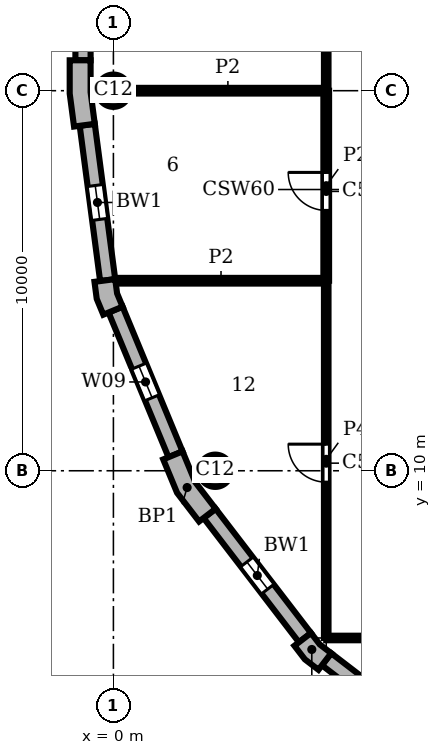
"""IFC4 building model, lengths in metres.
Left out: names, types, materials, properties, quantities, classifications, styles, units other than length and angle.
Written with IfcOpenShell. Run it as: python <this file> out.ifc"""

import sys

from ifc_helpers import new_model, si_unit, direction, frame, frame_2d, origin, origin_2d, place, context, subcontext, project, spatial, polyline, rectangle, circle, outline, extrude, element, fill, save


model = new_model("IFC4")
c1 = context("Model", 3, precision=1e-05, world=origin(), true_north=direction((0.0, 1.0)))
c2 = subcontext(c1, "Body", "Model", "MODEL_VIEW")
j1 = project(units=[si_unit("LENGTHUNIT", "METRE"), si_unit("PLANEANGLEUNIT", "RADIAN")], contexts=[c1])
p1 = place(None, origin())
s1 = spatial("IfcSite", under=j1, at=p1, CompositionType="ELEMENT")
p2 = place(p1, origin())
s2 = spatial("IfcBuilding", under=s1, at=p2, CompositionType="ELEMENT")
p3 = place(p2, frame((0.0, 0.0, 290.4)))
s3 = spatial("IfcBuildingStorey", under=s2, at=p3, CompositionType="ELEMENT", Elevation=290.4)
for number, where, z_axis, x_axis in (
    (1, (0.0, 20.0, 0.0), (0.0, 0.0, 1.0), (1.0, 0.0, 0.0)),
    (2, (2.679, 10.0, 0.0), (0.0, 0.0, 1.0), (1.0, 0.0, 0.0)),
):
    element("IfcColumn", number, at=place(p3, frame(where, z_axis=z_axis, x_axis=x_axis)), inside=s3, PredefinedType="COLUMN", context=c2, shape_type="SweptSolid", body=[
        extrude(circle(Radius=0.425, at=origin_2d()), origin(), (0.0, 0.0, 1.0), 3.9),
    ])
p4 = place(p3, origin())
e3 = element("IfcWall", 3, at=p4, inside=s3, PredefinedType="SOLIDWALL", context=c2, shape_type="SweptSolid", body=[
    extrude(outline(polyline([(-1.0, 20.8), (-1.15, 20.8), (-1.15, 19.925), (-1.036, 19.057), (-0.887, 19.076), (-0.49, 19.128), (-0.6, 19.961), (-0.6, 20.8), (-1.0, 20.8)])), origin(), (0.0, 0.0, 1.0), 3.9),
])
e4 = element("IfcWall", 4, at=p4, inside=s3, PredefinedType="SOLIDWALL", context=c2, shape_type="SweptSolid", body=[
    extrude(outline(polyline([(-0.349, 14.99), (-0.498, 14.971), (-0.439, 14.523), (-0.266, 14.106), (-0.128, 14.164), (0.242, 14.317), (0.097, 14.667), (0.047, 15.043), (-0.349, 14.99)])), origin(), (0.0, 0.0, 1.0), 3.9),
])
e5 = element("IfcWall", 5, at=p4, inside=s3, PredefinedType="SOLIDWALL", context=c2, shape_type="SweptSolid", body=[
    extrude(outline(polyline([(1.449, 10.356), (1.311, 10.299), (1.675, 9.42), (2.254, 8.665), (2.373, 8.757), (2.69, 9.0), (2.155, 9.698), (1.819, 10.51), (1.449, 10.356)])), origin(), (0.0, 0.0, 1.0), 3.9),
])
e6 = element("IfcWall", 6, at=p4, inside=s3, PredefinedType="SOLIDWALL", context=c2, shape_type="SweptSolid", body=[
    extrude(outline(polyline([(4.882, 5.487), (4.763, 5.396), (5.038, 5.038), (5.396, 4.763), (5.487, 4.882), (5.731, 5.199), (5.43, 5.43), (5.199, 5.731), (4.882, 5.487)])), origin(), (0.0, 0.0, 1.0), 3.9),
])
p5 = place(p3, frame((-0.8, 39.2, 0.0), z_axis=(0.0, 0.0, 1.0), x_axis=(0.0, -1.0, 0.0)))
e7 = element("IfcWall", 7, at=p5, inside=s3, PredefinedType="SOLIDWALL", context=c2, shape_type="SweptSolid", body=[
    extrude(rectangle(XDim=18.4, YDim=0.4, at=frame_2d((9.2, 0.0))), origin(), (0.0, 0.0, 1.0), 3.9),
])
p6 = place(p5, frame((3.75, 0.0, 0.9)))
e8 = element("IfcOpeningElement", 8, at=p6, cuts=e7, PredefinedType="OPENING", context=c2, shape_type="SweptSolid", body=[
    extrude(rectangle(XDim=0.9, YDim=2.35, at=frame_2d((0.45, 1.175))), frame((0.0, 0.21, 0.0), z_axis=(0.0, -1.0, 0.0), x_axis=(1.0, 0.0, 0.0)), (0.0, 0.0, 1.0), 0.42),
])
p7 = place(p5, frame((13.75, 0.0, 0.9)))
e9 = element("IfcOpeningElement", 9, at=p7, cuts=e7, PredefinedType="OPENING", context=c2, shape_type="SweptSolid", body=[
    extrude(rectangle(XDim=0.9, YDim=2.35, at=frame_2d((0.45, 1.175))), frame((0.0, 0.21, 0.0), z_axis=(0.0, -1.0, 0.0), x_axis=(1.0, 0.0, 0.0)), (0.0, 0.0, 1.0), 0.42),
])
p8 = place(p3, frame((-0.689, 19.102, 0.0), z_axis=(0.0, 0.0, 1.0), x_axis=(0.130514280502, -0.991446429508, 0.0)))
e10 = element("IfcWall", 10, at=p8, inside=s3, PredefinedType="SOLIDWALL", context=c2, shape_type="SweptSolid", body=[
    extrude(rectangle(XDim=4.121, YDim=0.4, at=frame_2d((2.061, 0.0))), origin(), (0.0, 0.0, 1.0), 3.9),
])
p9 = place(p8, frame((1.611, 0.0, 0.9)))
e11 = element("IfcOpeningElement", 11, at=p9, cuts=e10, PredefinedType="OPENING", context=c2, shape_type="SweptSolid", body=[
    extrude(rectangle(XDim=0.9, YDim=2.35, at=frame_2d((0.45, 1.175))), frame((0.0, 0.21, 0.0), z_axis=(0.0, -1.0, 0.0), x_axis=(1.0, 0.0, 0.0)), (0.0, 0.0, 1.0), 0.42),
])
p10 = place(p3, frame((0.057, 14.24, 0.0), z_axis=(0.0, 0.0, 1.0), x_axis=(0.382721546029, -0.923863744394, 0.0)))
e12 = element("IfcWall", 12, at=p10, inside=s3, PredefinedType="SOLIDWALL", context=c2, shape_type="SweptSolid", body=[
    extrude(rectangle(XDim=4.121, YDim=0.4, at=frame_2d((2.061, 0.0))), origin(), (0.0, 0.0, 1.0), 3.9),
])
p11 = place(p10, frame((1.611, 0.0, 0.9)))
e13 = element("IfcOpeningElement", 13, at=p11, cuts=e12, PredefinedType="OPENING", context=c2, shape_type="SweptSolid", body=[
    extrude(rectangle(XDim=0.9, YDim=2.35, at=frame_2d((0.45, 1.175))), frame((0.0, 0.21, 0.0), z_axis=(0.0, -1.0, 0.0), x_axis=(1.0, 0.0, 0.0)), (0.0, 0.0, 1.0), 0.42),
])
p12 = place(p3, frame((2.532, 8.878, 0.0), z_axis=(0.0, 0.0, 1.0), x_axis=(0.608759824817, -0.793354571229, 0.0)))
e14 = element("IfcWall", 14, at=p12, inside=s3, PredefinedType="SOLIDWALL", context=c2, shape_type="SweptSolid", body=[
    extrude(rectangle(XDim=4.121, YDim=0.4, at=frame_2d((2.061, 0.0))), origin(), (0.0, 0.0, 1.0), 3.9),
])
p13 = place(p12, frame((1.611, 0.0, 0.9)))
e15 = element("IfcOpeningElement", 15, at=p13, cuts=e14, PredefinedType="OPENING", context=c2, shape_type="SweptSolid", body=[
    extrude(rectangle(XDim=0.9, YDim=2.35, at=frame_2d((0.45, 1.175))), frame((0.0, 0.21, 0.0), z_axis=(0.0, -1.0, 0.0), x_axis=(1.0, 0.0, 0.0)), (0.0, 0.0, 1.0), 0.42),
])
p14 = place(p3, frame((5.609, 5.041, 0.0), z_axis=(0.0, 0.0, 1.0), x_axis=(0.793354571229, -0.608759824817, 0.0)))
e16 = element("IfcWall", 16, at=p14, inside=s3, PredefinedType="SOLIDWALL", context=c2, shape_type="SweptSolid", body=[
    extrude(rectangle(XDim=4.121, YDim=0.4, at=frame_2d((2.061, 0.0))), origin(), (0.0, 0.0, 1.0), 3.9),
])
p15 = place(p14, frame((1.611, 0.0, 0.9)))
e17 = element("IfcOpeningElement", 17, at=p15, cuts=e16, PredefinedType="OPENING", context=c2, shape_type="SweptSolid", body=[
    extrude(rectangle(XDim=0.9, YDim=2.35, at=frame_2d((0.45, 1.175))), frame((0.0, 0.21, 0.0), z_axis=(0.0, -1.0, 0.0), x_axis=(1.0, 0.0, 0.0)), (0.0, 0.0, 1.0), 0.42),
])
p16 = place(p3, frame((5.6, 15.0, 0.0), z_axis=(0.0, 0.0, 1.0), x_axis=(0.0, 1.0, 0.0)))
e18 = element("IfcWall", 18, at=p16, inside=s3, PredefinedType="PARTITIONING", context=c2, shape_type="SweptSolid", body=[
    extrude(rectangle(XDim=5.0, YDim=0.15, at=frame_2d((2.5, 0.0))), origin(), (0.0, 0.0, 1.0), 3.58),
])
p17 = place(p16, frame((1.85, 0.0, 0.0)))
e19 = element("IfcOpeningElement", 19, at=p17, cuts=e18, PredefinedType="OPENING", context=c2, shape_type="SweptSolid", body=[
    extrude(rectangle(XDim=1.0, YDim=2.1, at=frame_2d((0.5, 1.05))), frame((0.0, 0.085, 0.0), z_axis=(0.0, -1.0, 0.0), x_axis=(1.0, 0.0, 0.0)), (0.0, 0.0, 1.0), 0.17),
])
p18 = place(p3, frame((0.063, 15.0, 0.0), z_axis=(0.0, 0.0, 1.0), x_axis=(1.0, 0.0, 0.0)))
e20 = element("IfcWall", 20, at=p18, inside=s3, PredefinedType="PARTITIONING", context=c2, shape_type="SweptSolid", body=[
    extrude(rectangle(XDim=5.537, YDim=0.15, at=frame_2d((2.769, 0.0))), origin(), (0.0, 0.0, 1.0), 3.58),
])
p19 = place(p3, frame((0.425, 20.0, 0.0), z_axis=(0.0, 0.0, 1.0), x_axis=(1.0, 0.0, 0.0)))
e21 = element("IfcWall", 21, at=p19, inside=s3, PredefinedType="PARTITIONING", context=c2, shape_type="SweptSolid", body=[
    extrude(rectangle(XDim=5.175, YDim=0.15, at=frame_2d((2.587, 0.0))), origin(), (0.0, 0.0, 1.0), 3.58),
])
p20 = place(p3, frame((5.6, 5.6, 0.0), z_axis=(0.0, 0.0, 1.0), x_axis=(0.0, 1.0, 0.0)))
e22 = element("IfcWall", 22, at=p20, inside=s3, PredefinedType="PARTITIONING", context=c2, shape_type="SweptSolid", body=[
    extrude(rectangle(XDim=9.4, YDim=0.12, at=frame_2d((4.7, 0.0))), origin(), (0.0, 0.0, 1.0), 3.58),
])
p21 = place(p20, frame((4.1, 0.0, 0.0)))
e23 = element("IfcOpeningElement", 23, at=p21, cuts=e22, PredefinedType="OPENING", context=c2, shape_type="SweptSolid", body=[
    extrude(rectangle(XDim=1.0, YDim=2.1, at=frame_2d((0.5, 1.05))), frame((0.0, 0.07, 0.0), z_axis=(0.0, -1.0, 0.0), x_axis=(1.0, 0.0, 0.0)), (0.0, 0.0, 1.0), 0.14),
])
p22 = place(p3, frame((5.6, 20.0, 0.0), z_axis=(0.0, 0.0, 1.0), x_axis=(0.0, 1.0, 0.0)))
e24 = element("IfcWall", 24, at=p22, inside=s3, PredefinedType="PARTITIONING", context=c2, shape_type="SweptSolid", body=[
    extrude(rectangle(XDim=8.0, YDim=0.12, at=frame_2d((4.0, 0.0))), origin(), (0.0, 0.0, 1.0), 3.58),
])
p23 = place(p3, frame((5.6, 5.6, 0.0), z_axis=(0.0, 0.0, 1.0), x_axis=(1.0, 0.0, 0.0)))
e25 = element("IfcWall", 25, at=p23, inside=s3, PredefinedType="PARTITIONING", context=c2, shape_type="SweptSolid", body=[
    extrude(rectangle(XDim=9.4, YDim=0.12, at=frame_2d((4.7, 0.0))), origin(), (0.0, 0.0, 1.0), 3.58),
])
p24 = place(p23, frame((3.85, 0.0, 0.0)))
e26 = element("IfcOpeningElement", 26, at=p24, cuts=e25, PredefinedType="OPENING", context=c2, shape_type="SweptSolid", body=[
    extrude(rectangle(XDim=1.0, YDim=2.1, at=frame_2d((0.5, 1.05))), frame((0.0, 0.07, 0.0), z_axis=(0.0, -1.0, 0.0), x_axis=(1.0, 0.0, 0.0)), (0.0, 0.0, 1.0), 0.14),
])
p25 = place(p9, origin())
e27 = element("IfcWindow", 27, at=p25, inside=s3, PartitioningType="SINGLE_PANEL", PredefinedType="WINDOW", context=c2, shape_type="SweptSolid", body=[
    extrude(rectangle(XDim=0.9, YDim=2.35, at=frame_2d((0.45, 1.175))), frame((0.0, 0.16, 0.0), z_axis=(0.0, -1.0, 0.0), x_axis=(1.0, 0.0, 0.0)), (0.0, 0.0, 1.0), 0.06),
])
fill(e11, e27)
p26 = place(p11, origin())
e28 = element("IfcWindow", 28, at=p26, inside=s3, PartitioningType="SINGLE_PANEL", PredefinedType="WINDOW", context=c2, shape_type="SweptSolid", body=[
    extrude(rectangle(XDim=0.9, YDim=2.35, at=frame_2d((0.45, 1.175))), frame((0.0, 0.16, 0.0), z_axis=(0.0, -1.0, 0.0), x_axis=(1.0, 0.0, 0.0)), (0.0, 0.0, 1.0), 0.06),
])
fill(e13, e28)
p27 = place(p13, origin())
e29 = element("IfcWindow", 29, at=p27, inside=s3, PartitioningType="SINGLE_PANEL", PredefinedType="WINDOW", context=c2, shape_type="SweptSolid", body=[
    extrude(rectangle(XDim=0.9, YDim=2.35, at=frame_2d((0.45, 1.175))), frame((0.0, 0.16, 0.0), z_axis=(0.0, -1.0, 0.0), x_axis=(1.0, 0.0, 0.0)), (0.0, 0.0, 1.0), 0.06),
])
fill(e15, e29)
p28 = place(p21, origin())
e30 = element("IfcDoor", 30, at=p28, inside=s3, OperationType="SINGLE_SWING_RIGHT", PredefinedType="DOOR", context=c2, shape_type="SweptSolid", body=[
    extrude(rectangle(XDim=1.0, YDim=2.1, at=frame_2d((0.5, 1.05))), frame((0.0, 0.025, 0.0), z_axis=(0.0, -1.0, 0.0), x_axis=(1.0, 0.0, 0.0)), (0.0, 0.0, 1.0), 0.05),
])
fill(e23, e30)
p29 = place(p17, origin())
e31 = element("IfcDoor", 31, at=p29, inside=s3, OperationType="SINGLE_SWING_RIGHT", PredefinedType="DOOR", context=c2, shape_type="SweptSolid", body=[
    extrude(rectangle(XDim=1.0, YDim=2.1, at=frame_2d((0.5, 1.05))), frame((0.0, 0.025, 0.0), z_axis=(0.0, -1.0, 0.0), x_axis=(1.0, 0.0, 0.0)), (0.0, 0.0, 1.0), 0.05),
])
fill(e19, e31)
save(model, sys.argv[1])
